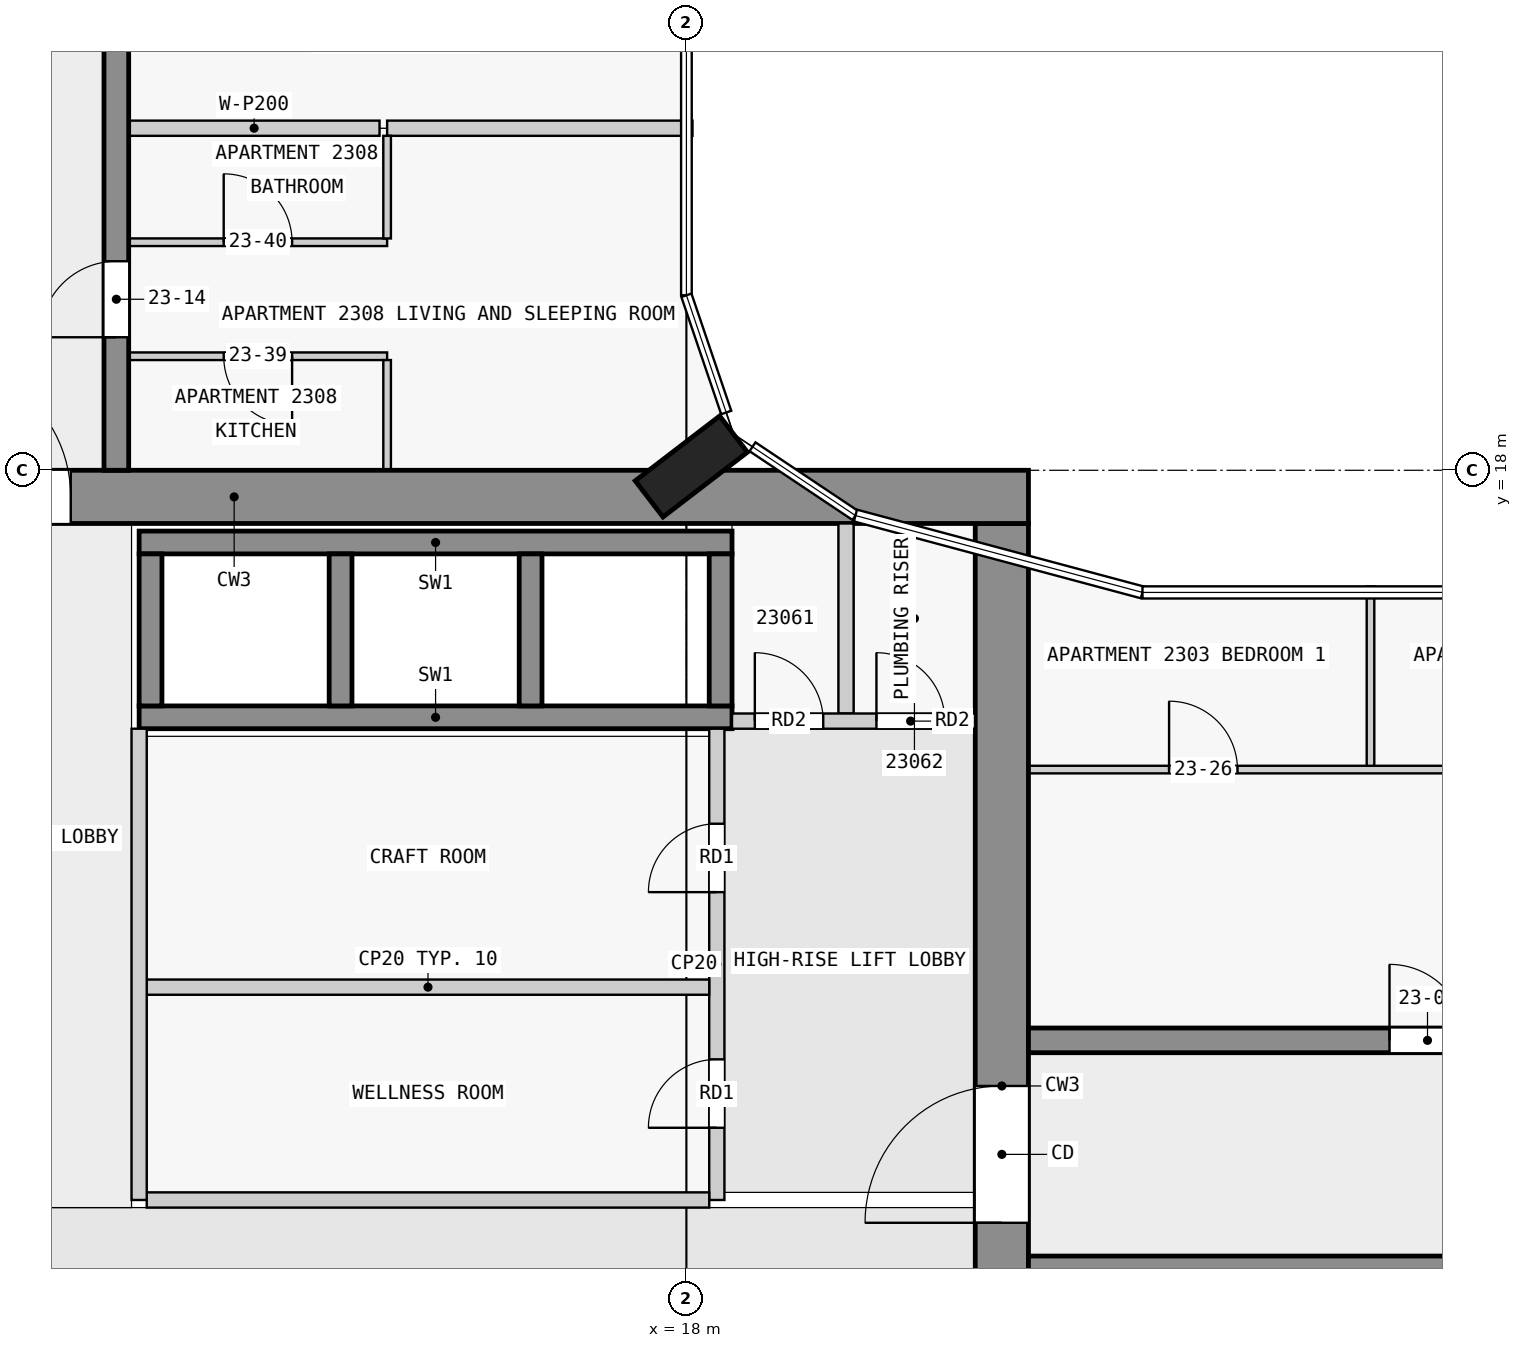
"""IFC4 building model, lengths in metres.
Left out: names, types, materials, properties, quantities, classifications, styles, units other than length and angle.
Written with IfcOpenShell. Run it as: python <this file> out.ifc"""

import sys

from ifc_helpers import new_model, si_unit, direction, frame, frame_2d, origin, origin_2d, place, context, subcontext, project, spatial, rectangle, extrude, element, fill, save


model = new_model("IFC4")
c1 = context("Model", 3, precision=1e-05, world=origin(), true_north=direction((0.0, 1.0)))
c2 = subcontext(c1, "Body", "Model", "MODEL_VIEW")
j1 = project(units=[si_unit("LENGTHUNIT", "METRE"), si_unit("PLANEANGLEUNIT", "RADIAN")], contexts=[c1])
p1 = place(None, origin())
s1 = spatial("IfcSite", under=j1, at=p1, CompositionType="ELEMENT")
p2 = place(p1, origin())
s2 = spatial("IfcBuilding", under=s1, at=p2, CompositionType="ELEMENT")
p3 = place(p2, frame((0.0, 0.0, 92.3)))
s3 = spatial("IfcBuildingStorey", under=s2, at=p3, CompositionType="ELEMENT", Elevation=92.3)
p4 = place(p3, frame((18.065, 18.05, 0.0), z_axis=(0.0, 0.0, 1.0), x_axis=(-0.608810846443, 0.793315418515, 0.0)))
e1 = element("IfcColumn", 1, at=p4, inside=s3, PredefinedType="COLUMN", context=c2, shape_type="SweptSolid", body=[
    extrude(rectangle(XDim=0.6, YDim=1.4, at=origin_2d()), origin(), (0.0, 0.0, 1.0), 3.5),
])
p5 = place(p3, frame((1.6, 17.65, 0.0), z_axis=(0.0, 0.0, 1.0), x_axis=(1.0, 0.0, 0.0)))
e2 = element("IfcWall", 2, at=p5, inside=s3, PredefinedType="SHEAR", context=c2, shape_type="SweptSolid", body=[
    extrude(rectangle(XDim=20.9, YDim=0.7, at=frame_2d((10.45, 0.0))), origin(), (0.0, 0.0, 1.0), 3.25),
])
p6 = place(p5, frame((6.5, 0.0, 0.0)))
e3 = element("IfcOpeningElement", 3, at=p6, cuts=e2, PredefinedType="OPENING", context=c2, shape_type="SweptSolid", body=[
    extrude(rectangle(XDim=1.8, YDim=2.1, at=frame_2d((0.9, 1.05))), frame((0.0, 0.36, 0.0), z_axis=(0.0, -1.0, 0.0), x_axis=(1.0, 0.0, 0.0)), (0.0, 0.0, 1.0), 0.72),
])
p7 = place(p3, frame((22.15, 2.5, 0.0), z_axis=(0.0, 0.0, 1.0), x_axis=(0.0, 1.0, 0.0)))
e4 = element("IfcWall", 4, at=p7, inside=s3, PredefinedType="SHEAR", context=c2, shape_type="SweptSolid", body=[
    extrude(rectangle(XDim=14.8, YDim=0.7, at=frame_2d((7.4, 0.0))), origin(), (0.0, 0.0, 1.0), 3.25),
])
p8 = place(p7, frame((5.6, 0.0, 0.0)))
e5 = element("IfcOpeningElement", 5, at=p8, cuts=e4, PredefinedType="OPENING", context=c2, shape_type="SweptSolid", body=[
    extrude(rectangle(XDim=1.8, YDim=2.1, at=frame_2d((0.9, 1.05))), frame((0.0, 0.36, 0.0), z_axis=(0.0, -1.0, 0.0), x_axis=(1.0, 0.0, 0.0)), (0.0, 0.0, 1.0), 0.72),
])
for number, where, z_axis, x_axis in (
    (6, (10.8, 17.05, 0.0), (0.0, 0.0, 1.0), (1.0, 0.0, 0.0)),
    (7, (10.8, 14.75, 0.0), (0.0, 0.0, 1.0), (1.0, 0.0, 0.0)),
):
    element("IfcWall", number, at=place(p3, frame(where, z_axis=z_axis, x_axis=x_axis)), inside=s3, PredefinedType="SHEAR", context=c2, shape_type="SweptSolid", body=[
        extrude(rectangle(XDim=7.8, YDim=0.3, at=frame_2d((3.9, 0.0))), origin(), (0.0, 0.0, 1.0), 3.25),
    ])
for number, where, z_axis, x_axis in (
    (8, (10.95, 14.9, 0.0), (0.0, 0.0, 1.0), (0.0, 1.0, 0.0)),
    (9, (13.45, 14.9, 0.0), (0.0, 0.0, 1.0), (0.0, 1.0, 0.0)),
    (10, (15.95, 14.9, 0.0), (0.0, 0.0, 1.0), (0.0, 1.0, 0.0)),
    (11, (18.45, 14.9, 0.0), (0.0, 0.0, 1.0), (0.0, 1.0, 0.0)),
):
    element("IfcWall", number, at=place(p3, frame(where, z_axis=z_axis, x_axis=x_axis)), inside=s3, PredefinedType="SHEAR", context=c2, shape_type="SweptSolid", body=[
        extrude(rectangle(XDim=2.0, YDim=0.3, at=frame_2d((1.0, 0.0))), origin(), (0.0, 0.0, 1.0), 3.25),
    ])
p9 = place(p3, frame((22.5, 7.5, 0.0), z_axis=(0.0, 0.0, 1.0), x_axis=(1.0, 0.0, 0.0)))
e12 = element("IfcWall", 12, at=p9, inside=s3, PredefinedType="SHEAR", context=c2, shape_type="SweptSolid", body=[
    extrude(rectangle(XDim=22.5, YDim=0.325, at=frame_2d((11.25, 0.0))), origin(), (0.0, 0.0, 1.0), 3.25),
])
p10 = place(p9, frame((5.65, 0.0, 0.0)))
e13 = element("IfcOpeningElement", 13, at=p10, cuts=e12, PredefinedType="OPENING", context=c2, shape_type="SweptSolid", body=[
    extrude(rectangle(XDim=1.0, YDim=2.1, at=frame_2d((0.5, 1.05))), frame((0.0, 0.172, 0.0), z_axis=(0.0, -1.0, 0.0), x_axis=(1.0, 0.0, 0.0)), (0.0, 0.0, 1.0), 0.345),
])
p11 = place(p9, frame((15.25, 0.0, 0.0)))
e14 = element("IfcOpeningElement", 14, at=p11, cuts=e12, PredefinedType="OPENING", context=c2, shape_type="SweptSolid", body=[
    extrude(rectangle(XDim=1.0, YDim=2.1, at=frame_2d((0.5, 1.05))), frame((0.0, 0.172, 0.0), z_axis=(0.0, -1.0, 0.0), x_axis=(1.0, 0.0, 0.0)), (0.0, 0.0, 1.0), 0.345),
])
p12 = place(p9, frame((18.75, 0.0, 0.0)))
e15 = element("IfcOpeningElement", 15, at=p12, cuts=e12, PredefinedType="OPENING", context=c2, shape_type="SweptSolid", body=[
    extrude(rectangle(XDim=0.9, YDim=2.1, at=frame_2d((0.45, 1.05))), frame((0.0, 0.172, 0.0), z_axis=(0.0, -1.0, 0.0), x_axis=(1.0, 0.0, 0.0)), (0.0, 0.0, 1.0), 0.345),
])
p13 = place(p9, frame((20.95, 0.0, 0.0)))
e16 = element("IfcOpeningElement", 16, at=p13, cuts=e12, PredefinedType="OPENING", context=c2, shape_type="SweptSolid", body=[
    extrude(rectangle(XDim=1.0, YDim=2.1, at=frame_2d((0.5, 1.05))), frame((0.0, 0.172, 0.0), z_axis=(0.0, -1.0, 0.0), x_axis=(1.0, 0.0, 0.0)), (0.0, 0.0, 1.0), 0.345),
])
p14 = place(p3, frame((22.5, 10.5, 0.0), z_axis=(0.0, 0.0, 1.0), x_axis=(1.0, 0.0, 0.0)))
e17 = element("IfcWall", 17, at=p14, inside=s3, PredefinedType="SHEAR", context=c2, shape_type="SweptSolid", body=[
    extrude(rectangle(XDim=22.5, YDim=0.325, at=frame_2d((11.25, 0.0))), origin(), (0.0, 0.0, 1.0), 3.25),
])
p15 = place(p14, frame((4.75, 0.0, 0.0)))
e18 = element("IfcOpeningElement", 18, at=p15, cuts=e17, PredefinedType="OPENING", context=c2, shape_type="SweptSolid", body=[
    extrude(rectangle(XDim=1.0, YDim=2.1, at=frame_2d((0.5, 1.05))), frame((0.0, 0.172, 0.0), z_axis=(0.0, -1.0, 0.0), x_axis=(1.0, 0.0, 0.0)), (0.0, 0.0, 1.0), 0.345),
])
p16 = place(p14, frame((16.85, 0.0, 0.0)))
e19 = element("IfcOpeningElement", 19, at=p16, cuts=e17, PredefinedType="OPENING", context=c2, shape_type="SweptSolid", body=[
    extrude(rectangle(XDim=1.0, YDim=2.1, at=frame_2d((0.5, 1.05))), frame((0.0, 0.172, 0.0), z_axis=(0.0, -1.0, 0.0), x_axis=(1.0, 0.0, 0.0)), (0.0, 0.0, 1.0), 0.345),
])
p17 = place(p3, frame((10.5, 18.0, 0.0), z_axis=(0.0, 0.0, 1.0), x_axis=(0.0, 1.0, 0.0)))
e20 = element("IfcWall", 20, at=p17, inside=s3, PredefinedType="SHEAR", context=c2, shape_type="SweptSolid", body=[
    extrude(rectangle(XDim=27.0, YDim=0.325, at=frame_2d((13.5, 0.0))), origin(), (0.0, 0.0, 1.0), 3.25),
])
p18 = place(p17, frame((1.75, 0.0, 0.0)))
e21 = element("IfcOpeningElement", 21, at=p18, cuts=e20, PredefinedType="OPENING", context=c2, shape_type="SweptSolid", body=[
    extrude(rectangle(XDim=1.0, YDim=2.1, at=frame_2d((0.5, 1.05))), frame((0.0, 0.172, 0.0), z_axis=(0.0, -1.0, 0.0), x_axis=(1.0, 0.0, 0.0)), (0.0, 0.0, 1.0), 0.345),
])
p19 = place(p17, frame((6.25, 0.0, 0.0)))
e22 = element("IfcOpeningElement", 22, at=p19, cuts=e20, PredefinedType="OPENING", context=c2, shape_type="SweptSolid", body=[
    extrude(rectangle(XDim=1.0, YDim=2.1, at=frame_2d((0.5, 1.05))), frame((0.0, 0.172, 0.0), z_axis=(0.0, -1.0, 0.0), x_axis=(1.0, 0.0, 0.0)), (0.0, 0.0, 1.0), 0.345),
])
p20 = place(p17, frame((13.05, 0.0, 0.0)))
e23 = element("IfcOpeningElement", 23, at=p20, cuts=e20, PredefinedType="OPENING", context=c2, shape_type="SweptSolid", body=[
    extrude(rectangle(XDim=1.0, YDim=2.1, at=frame_2d((0.5, 1.05))), frame((0.0, 0.172, 0.0), z_axis=(0.0, -1.0, 0.0), x_axis=(1.0, 0.0, 0.0)), (0.0, 0.0, 1.0), 0.345),
])
p21 = place(p17, frame((21.35, 0.0, 0.0)))
e24 = element("IfcOpeningElement", 24, at=p21, cuts=e20, PredefinedType="OPENING", context=c2, shape_type="SweptSolid", body=[
    extrude(rectangle(XDim=1.0, YDim=2.1, at=frame_2d((0.5, 1.05))), frame((0.0, 0.172, 0.0), z_axis=(0.0, -1.0, 0.0), x_axis=(1.0, 0.0, 0.0)), (0.0, 0.0, 1.0), 0.345),
])
p22 = place(p3, frame((10.8, 8.4, 0.0), z_axis=(0.0, 0.0, 1.0), x_axis=(0.0, 1.0, 0.0)))
e25 = element("IfcWall", 25, at=p22, inside=s3, PredefinedType="PARTITIONING", context=c2, shape_type="SweptSolid", body=[
    extrude(rectangle(XDim=6.2, YDim=0.2, at=frame_2d((3.1, 0.0))), origin(), (0.0, 0.0, 1.0), 3.25),
])
p23 = place(p3, frame((10.9, 8.4, 0.0), z_axis=(0.0, 0.0, 1.0), x_axis=(1.0, 0.0, 0.0)))
e26 = element("IfcWall", 26, at=p23, inside=s3, PredefinedType="PARTITIONING", context=c2, shape_type="SweptSolid", body=[
    extrude(rectangle(XDim=7.4, YDim=0.2, at=frame_2d((3.7, 0.0))), origin(), (0.0, 0.0, 1.0), 3.25),
])
p24 = place(p3, frame((18.4, 8.4, 0.0), z_axis=(0.0, 0.0, 1.0), x_axis=(0.0, 1.0, 0.0)))
e27 = element("IfcWall", 27, at=p24, inside=s3, PredefinedType="PARTITIONING", context=c2, shape_type="SweptSolid", body=[
    extrude(rectangle(XDim=6.2, YDim=0.2, at=frame_2d((3.1, 0.0))), origin(), (0.0, 0.0, 1.0), 3.25),
])
p25 = place(p24, frame((0.95, 0.0, 0.0)))
e28 = element("IfcOpeningElement", 28, at=p25, cuts=e27, PredefinedType="OPENING", context=c2, shape_type="SweptSolid", body=[
    extrude(rectangle(XDim=0.9, YDim=2.1, at=frame_2d((0.45, 1.05))), frame((0.0, 0.11, 0.0), z_axis=(0.0, -1.0, 0.0), x_axis=(1.0, 0.0, 0.0)), (0.0, 0.0, 1.0), 0.22),
])
p26 = place(p24, frame((4.05, 0.0, 0.0)))
e29 = element("IfcOpeningElement", 29, at=p26, cuts=e27, PredefinedType="OPENING", context=c2, shape_type="SweptSolid", body=[
    extrude(rectangle(XDim=0.9, YDim=2.1, at=frame_2d((0.45, 1.05))), frame((0.0, 0.11, 0.0), z_axis=(0.0, -1.0, 0.0), x_axis=(1.0, 0.0, 0.0)), (0.0, 0.0, 1.0), 0.22),
])
p27 = place(p3, frame((10.9, 11.2, 0.0), z_axis=(0.0, 0.0, 1.0), x_axis=(1.0, 0.0, 0.0)))
e30 = element("IfcWall", 30, at=p27, inside=s3, PredefinedType="PARTITIONING", context=c2, shape_type="SweptSolid", body=[
    extrude(rectangle(XDim=7.4, YDim=0.2, at=frame_2d((3.7, 0.0))), origin(), (0.0, 0.0, 1.0), 3.25),
])
p28 = place(p3, frame((18.6, 14.7, 0.0), z_axis=(0.0, 0.0, 1.0), x_axis=(1.0, 0.0, 0.0)))
e31 = element("IfcWall", 31, at=p28, inside=s3, PredefinedType="PARTITIONING", context=c2, shape_type="SweptSolid", body=[
    extrude(rectangle(XDim=3.2, YDim=0.2, at=frame_2d((1.6, 0.0))), origin(), (0.0, 0.0, 1.0), 3.25),
])
p29 = place(p28, frame((0.3, 0.0, 0.0)))
e32 = element("IfcOpeningElement", 32, at=p29, cuts=e31, PredefinedType="OPENING", context=c2, shape_type="SweptSolid", body=[
    extrude(rectangle(XDim=0.9, YDim=2.1, at=frame_2d((0.45, 1.05))), frame((0.0, 0.11, 0.0), z_axis=(0.0, -1.0, 0.0), x_axis=(1.0, 0.0, 0.0)), (0.0, 0.0, 1.0), 0.22),
])
p30 = place(p28, frame((1.9, 0.0, 0.0)))
e33 = element("IfcOpeningElement", 33, at=p30, cuts=e31, PredefinedType="OPENING", context=c2, shape_type="SweptSolid", body=[
    extrude(rectangle(XDim=0.9, YDim=2.1, at=frame_2d((0.45, 1.05))), frame((0.0, 0.11, 0.0), z_axis=(0.0, -1.0, 0.0), x_axis=(1.0, 0.0, 0.0)), (0.0, 0.0, 1.0), 0.22),
])
p31 = place(p3, frame((20.1, 14.8, 0.0), z_axis=(0.0, 0.0, 1.0), x_axis=(0.0, 1.0, 0.0)))
e34 = element("IfcWall", 34, at=p31, inside=s3, PredefinedType="PARTITIONING", context=c2, shape_type="SweptSolid", body=[
    extrude(rectangle(XDim=2.5, YDim=0.2, at=frame_2d((1.25, 0.0))), origin(), (0.0, 0.0, 1.0), 3.25),
])
p32 = place(p3, frame((22.5, 14.062, 0.0), z_axis=(0.0, 0.0, 1.0), x_axis=(1.0, 0.0, 0.0)))
e35 = element("IfcWall", 35, at=p32, inside=s3, PredefinedType="PARTITIONING", context=c2, shape_type="SweptSolid", body=[
    extrude(rectangle(XDim=9.0, YDim=0.1, at=frame_2d((4.5, 0.0))), origin(), (0.0, 0.0, 1.0), 3.25),
])
p33 = place(p32, frame((1.85, 0.0, 0.0)))
e36 = element("IfcOpeningElement", 36, at=p33, cuts=e35, PredefinedType="OPENING", context=c2, shape_type="SweptSolid", body=[
    extrude(rectangle(XDim=0.9, YDim=2.1, at=frame_2d((0.45, 1.05))), frame((0.0, 0.06, 0.0), z_axis=(0.0, -1.0, 0.0), x_axis=(1.0, 0.0, 0.0)), (0.0, 0.0, 1.0), 0.12),
])
p34 = place(p32, frame((6.25, 0.0, 0.0)))
e37 = element("IfcOpeningElement", 37, at=p34, cuts=e35, PredefinedType="OPENING", context=c2, shape_type="SweptSolid", body=[
    extrude(rectangle(XDim=0.9, YDim=2.1, at=frame_2d((0.45, 1.05))), frame((0.0, 0.06, 0.0), z_axis=(0.0, -1.0, 0.0), x_axis=(1.0, 0.0, 0.0)), (0.0, 0.0, 1.0), 0.12),
])
p35 = place(p3, frame((14.062, 19.5, 0.0), z_axis=(0.0, 0.0, 1.0), x_axis=(-1.0, 0.0, 0.0)))
e38 = element("IfcWall", 38, at=p35, inside=s3, PredefinedType="PARTITIONING", context=c2, shape_type="SweptSolid", body=[
    extrude(rectangle(XDim=3.4, YDim=0.1, at=frame_2d((1.7, 0.0))), origin(), (0.0, 0.0, 1.0), 3.25),
])
p36 = place(p35, frame((1.25, 0.0, 0.0)))
e39 = element("IfcOpeningElement", 39, at=p36, cuts=e38, PredefinedType="OPENING", context=c2, shape_type="SweptSolid", body=[
    extrude(rectangle(XDim=0.9, YDim=2.1, at=frame_2d((0.45, 1.05))), frame((0.0, 0.06, 0.0), z_axis=(0.0, -1.0, 0.0), x_axis=(1.0, 0.0, 0.0)), (0.0, 0.0, 1.0), 0.12),
])
p37 = place(p3, frame((10.663, 21.0, 0.0), z_axis=(0.0, 0.0, 1.0), x_axis=(1.0, 0.0, 0.0)))
e40 = element("IfcWall", 40, at=p37, inside=s3, PredefinedType="PARTITIONING", context=c2, shape_type="SweptSolid", body=[
    extrude(rectangle(XDim=3.4, YDim=0.1, at=frame_2d((1.7, 0.0))), origin(), (0.0, 0.0, 1.0), 3.25),
])
p38 = place(p37, frame((1.25, 0.0, 0.0)))
e41 = element("IfcOpeningElement", 41, at=p38, cuts=e40, PredefinedType="OPENING", context=c2, shape_type="SweptSolid", body=[
    extrude(rectangle(XDim=0.9, YDim=2.1, at=frame_2d((0.45, 1.05))), frame((0.0, 0.06, 0.0), z_axis=(0.0, -1.0, 0.0), x_axis=(1.0, 0.0, 0.0)), (0.0, 0.0, 1.0), 0.12),
])
p39 = place(p3, frame((13.962, 22.5, 0.0), z_axis=(0.0, 0.0, 1.0), x_axis=(-1.0, 0.0, 0.0)))
e42 = element("IfcWall", 42, at=p39, inside=s3, PredefinedType="PARTITIONING", context=c2, shape_type="SweptSolid", body=[
    extrude(rectangle(XDim=3.3, YDim=0.2, at=frame_2d((1.65, 0.0))), origin(), (0.0, 0.0, 1.0), 3.25),
])
p40 = place(p3, frame((14.062, 22.5, 0.0), z_axis=(0.0, 0.0, 1.0), x_axis=(1.0, 0.0, 0.0)))
e43 = element("IfcWall", 43, at=p40, inside=s3, PredefinedType="PARTITIONING", context=c2, shape_type="SweptSolid", body=[
    extrude(rectangle(XDim=4.018, YDim=0.2, at=frame_2d((2.009, 0.0))), origin(), (0.0, 0.0, 1.0), 3.25),
])
p41 = place(p3, frame((14.062, 18.0, 0.0), z_axis=(0.0, 0.0, 1.0), x_axis=(0.0, 1.0, 0.0)))
e44 = element("IfcWall", 44, at=p41, inside=s3, PredefinedType="PARTITIONING", context=c2, shape_type="SweptSolid", body=[
    extrude(rectangle(XDim=1.45, YDim=0.1, at=frame_2d((0.725, 0.0))), origin(), (0.0, 0.0, 1.0), 3.25),
])
p42 = place(p3, frame((14.062, 21.05, 0.0), z_axis=(0.0, 0.0, 1.0), x_axis=(0.0, 1.0, 0.0)))
e45 = element("IfcWall", 45, at=p42, inside=s3, PredefinedType="PARTITIONING", context=c2, shape_type="SweptSolid", body=[
    extrude(rectangle(XDim=1.35, YDim=0.1, at=frame_2d((0.675, 0.0))), origin(), (0.0, 0.0, 1.0), 3.25),
])
p43 = place(p3, frame((27.0, 14.113, 0.0), z_axis=(0.0, 0.0, 1.0), x_axis=(0.0, 1.0, 0.0)))
e46 = element("IfcWall", 46, at=p43, inside=s3, PredefinedType="PARTITIONING", context=c2, shape_type="SweptSolid", body=[
    extrude(rectangle(XDim=2.361, YDim=0.1, at=frame_2d((1.18, 0.0))), origin(), (0.0, 0.0, 1.0), 3.25),
])
p44 = place(p25, origin())
e47 = element("IfcDoor", 47, at=p44, inside=s3, OperationType="SINGLE_SWING_LEFT", PredefinedType="DOOR", context=c2, shape_type="SweptSolid", body=[
    extrude(rectangle(XDim=0.9, YDim=2.1, at=frame_2d((0.45, 1.05))), frame((0.0, 0.025, 0.0), z_axis=(0.0, -1.0, 0.0), x_axis=(1.0, 0.0, 0.0)), (0.0, 0.0, 1.0), 0.05),
])
fill(e28, e47)
p45 = place(p26, origin())
e48 = element("IfcDoor", 48, at=p45, inside=s3, OperationType="SINGLE_SWING_LEFT", PredefinedType="DOOR", context=c2, shape_type="SweptSolid", body=[
    extrude(rectangle(XDim=0.9, YDim=2.1, at=frame_2d((0.45, 1.05))), frame((0.0, 0.025, 0.0), z_axis=(0.0, -1.0, 0.0), x_axis=(1.0, 0.0, 0.0)), (0.0, 0.0, 1.0), 0.05),
])
fill(e29, e48)
p46 = place(p8, origin())
e49 = element("IfcDoor", 49, at=p46, inside=s3, OperationType="DOUBLE_DOOR_SINGLE_SWING", PredefinedType="DOOR", context=c2, shape_type="SweptSolid", body=[
    extrude(rectangle(XDim=1.8, YDim=2.1, at=frame_2d((0.9, 1.05))), frame((0.0, 0.025, 0.0), z_axis=(0.0, -1.0, 0.0), x_axis=(1.0, 0.0, 0.0)), (0.0, 0.0, 1.0), 0.05),
])
fill(e5, e49)
p47 = place(p6, origin())
e50 = element("IfcDoor", 50, at=p47, inside=s3, OperationType="DOUBLE_DOOR_SINGLE_SWING", PredefinedType="DOOR", context=c2, shape_type="SweptSolid", body=[
    extrude(rectangle(XDim=1.8, YDim=2.1, at=frame_2d((0.9, 1.05))), frame((0.0, 0.025, 0.0), z_axis=(0.0, -1.0, 0.0), x_axis=(1.0, 0.0, 0.0)), (0.0, 0.0, 1.0), 0.05),
])
fill(e3, e50)
p48 = place(p29, origin())
e51 = element("IfcDoor", 51, at=p48, inside=s3, OperationType="SINGLE_SWING_LEFT", PredefinedType="DOOR", context=c2, shape_type="SweptSolid", body=[
    extrude(rectangle(XDim=0.9, YDim=2.1, at=frame_2d((0.45, 1.05))), frame((0.0, 0.025, 0.0), z_axis=(0.0, -1.0, 0.0), x_axis=(1.0, 0.0, 0.0)), (0.0, 0.0, 1.0), 0.05),
])
fill(e32, e51)
p49 = place(p30, origin())
e52 = element("IfcDoor", 52, at=p49, inside=s3, OperationType="SINGLE_SWING_LEFT", PredefinedType="DOOR", context=c2, shape_type="SweptSolid", body=[
    extrude(rectangle(XDim=0.9, YDim=2.1, at=frame_2d((0.45, 1.05))), frame((0.0, 0.025, 0.0), z_axis=(0.0, -1.0, 0.0), x_axis=(1.0, 0.0, 0.0)), (0.0, 0.0, 1.0), 0.05),
])
fill(e33, e52)
p50 = place(p15, origin())
e53 = element("IfcDoor", 53, at=p50, inside=s3, OperationType="SINGLE_SWING_LEFT", PredefinedType="DOOR", context=c2, shape_type="SweptSolid", body=[
    extrude(rectangle(XDim=1.0, YDim=2.1, at=frame_2d((0.5, 1.05))), frame((0.0, 0.025, 0.0), z_axis=(0.0, -1.0, 0.0), x_axis=(1.0, 0.0, 0.0)), (0.0, 0.0, 1.0), 0.05),
])
fill(e18, e53)
p51 = place(p18, origin())
e54 = element("IfcDoor", 54, at=p51, inside=s3, OperationType="SINGLE_SWING_LEFT", PredefinedType="DOOR", context=c2, shape_type="SweptSolid", body=[
    extrude(rectangle(XDim=1.0, YDim=2.1, at=frame_2d((0.5, 1.05))), frame((0.0, 0.025, 0.0), z_axis=(0.0, -1.0, 0.0), x_axis=(1.0, 0.0, 0.0)), (0.0, 0.0, 1.0), 0.05),
])
fill(e21, e54)
p52 = place(p33, origin())
e55 = element("IfcDoor", 55, at=p52, inside=s3, OperationType="SINGLE_SWING_LEFT", PredefinedType="DOOR", context=c2, shape_type="SweptSolid", body=[
    extrude(rectangle(XDim=0.9, YDim=2.1, at=frame_2d((0.45, 1.05))), frame((0.0, 0.025, 0.0), z_axis=(0.0, -1.0, 0.0), x_axis=(1.0, 0.0, 0.0)), (0.0, 0.0, 1.0), 0.05),
])
fill(e36, e55)
p53 = place(p36, origin())
e56 = element("IfcDoor", 56, at=p53, inside=s3, OperationType="SINGLE_SWING_LEFT", PredefinedType="DOOR", context=c2, shape_type="SweptSolid", body=[
    extrude(rectangle(XDim=0.9, YDim=2.1, at=frame_2d((0.45, 1.05))), frame((0.0, 0.025, 0.0), z_axis=(0.0, -1.0, 0.0), x_axis=(1.0, 0.0, 0.0)), (0.0, 0.0, 1.0), 0.05),
])
fill(e39, e56)
p54 = place(p38, origin())
e57 = element("IfcDoor", 57, at=p54, inside=s3, OperationType="SINGLE_SWING_LEFT", PredefinedType="DOOR", context=c2, shape_type="SweptSolid", body=[
    extrude(rectangle(XDim=0.9, YDim=2.1, at=frame_2d((0.45, 1.05))), frame((0.0, 0.025, 0.0), z_axis=(0.0, -1.0, 0.0), x_axis=(1.0, 0.0, 0.0)), (0.0, 0.0, 1.0), 0.05),
])
fill(e41, e57)
save(model, sys.argv[1])
